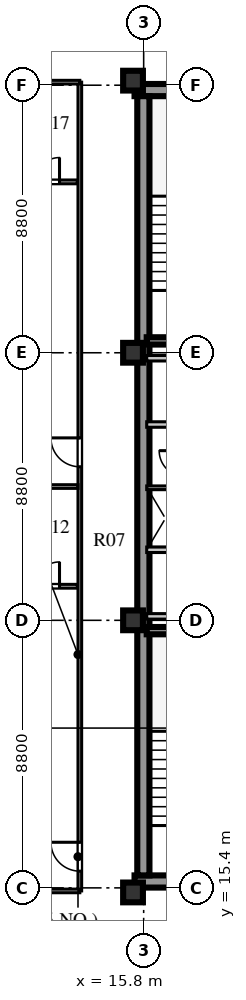
"""IFC4 building model, lengths in metres.
Left out: names, types, materials, properties, quantities, classifications, styles, units other than length and angle.
Written with IfcOpenShell. Run it as: python <this file> out.ifc"""

import sys

from ifc_helpers import new_model, si_unit, direction, frame, frame_2d, origin, origin_2d, place, context, subcontext, project, spatial, rectangle, extrude, element, fill, save


model = new_model("IFC4")
c1 = context("Model", 3, precision=1e-05, world=origin(), true_north=direction((0.0, 1.0)))
c2 = subcontext(c1, "Body", "Model", "MODEL_VIEW")
j1 = project(units=[si_unit("LENGTHUNIT", "METRE"), si_unit("PLANEANGLEUNIT", "RADIAN")], contexts=[c1])
p1 = place(None, origin())
s1 = spatial("IfcSite", under=j1, at=p1, CompositionType="ELEMENT")
p2 = place(p1, origin())
s2 = spatial("IfcBuilding", under=s1, at=p2, CompositionType="ELEMENT")
p3 = place(p2, frame((0.0, 0.0, 214.1)))
s3 = spatial("IfcBuildingStorey", under=s2, at=p3, CompositionType="ELEMENT", Elevation=214.1)
for number, where, z_axis, x_axis in (
    (1, (15.5, 15.61, 0.0), (0.0, 0.0, 1.0), (1.0, 0.0, 0.0)),
    (2, (15.5, 41.64, 0.0), (0.0, 0.0, 1.0), (1.0, 0.0, 0.0)),
):
    element("IfcWall", number, at=place(p3, frame(where, z_axis=z_axis, x_axis=x_axis)), inside=s3, PredefinedType="SHEAR", context=c2, shape_type="SweptSolid", body=[
        extrude(rectangle(XDim=9.48, YDim=0.4, at=frame_2d((4.74, 0.0))), origin(), (0.0, 0.0, 1.0), 3.66),
    ])
p4 = place(p3, frame((15.79, 15.81, 0.0), z_axis=(0.0, 0.0, 1.0), x_axis=(0.0, 1.0, 0.0)))
e3 = element("IfcWall", 3, at=p4, inside=s3, PredefinedType="SHEAR", context=c2, shape_type="SweptSolid", body=[
    extrude(rectangle(XDim=25.63, YDim=0.4, at=frame_2d((12.815, 0.0))), origin(), (0.0, 0.0, 1.0), 3.66),
])
for number, where, z_axis, x_axis in (
    (4, (15.45, 15.25, 0.0), (0.0, 0.0, 1.0), (1.0, 0.0, 0.0)),
    (5, (15.45, 24.2, 0.0), (0.0, 0.0, 1.0), (1.0, 0.0, 0.0)),
    (6, (15.45, 33.0, 0.0), (0.0, 0.0, 1.0), (1.0, 0.0, 0.0)),
    (7, (15.45, 41.95, 0.0), (0.0, 0.0, 1.0), (1.0, 0.0, 0.0)),
):
    element("IfcColumn", number, at=place(p3, frame(where, z_axis=z_axis, x_axis=x_axis)), inside=s3, PredefinedType="COLUMN", context=c2, shape_type="SweptSolid", body=[
        extrude(rectangle(XDim=0.65, YDim=0.65, at=origin_2d()), origin(), (0.0, 0.0, 1.0), 3.66),
    ])
p5 = place(p3, frame((15.9, 23.86, 0.0), z_axis=(0.0, 0.0, 1.0), x_axis=(1.0, 0.0, 0.0)))
e8 = element("IfcWall", 8, at=p5, inside=s3, PredefinedType="SHEAR", context=c2, shape_type="SweptSolid", body=[
    extrude(rectangle(XDim=3.52, YDim=0.24, at=frame_2d((1.76, 0.0))), origin(), (0.0, 0.0, 1.0), 3.9),
])
p6 = place(p3, frame((15.9, 26.52, 0.0), z_axis=(0.0, 0.0, 1.0), x_axis=(1.0, 0.0, 0.0)))
e9 = element("IfcWall", 9, at=p6, inside=s3, PredefinedType="SOLIDWALL", context=c2, shape_type="SweptSolid", body=[
    extrude(rectangle(XDim=8.68, YDim=0.18, at=frame_2d((4.34, 0.0))), origin(), (0.0, 0.0, 1.0), 3.66),
])
p7 = place(p6, frame((2.5, 0.0, 0.0)))
e10 = element("IfcOpeningElement", 10, at=p7, cuts=e9, PredefinedType="OPENING", context=c2, shape_type="SweptSolid", body=[
    extrude(rectangle(XDim=0.95, YDim=2.1, at=frame_2d((0.475, 1.05))), frame((0.0, 0.1, 0.0), z_axis=(0.0, -1.0, 0.0), x_axis=(1.0, 0.0, 0.0)), (0.0, 0.0, 1.0), 0.2),
])
p8 = place(p6, frame((6.0, 0.0, 0.0)))
e11 = element("IfcOpeningElement", 11, at=p8, cuts=e9, PredefinedType="OPENING", context=c2, shape_type="SweptSolid", body=[
    extrude(rectangle(XDim=0.95, YDim=2.1, at=frame_2d((0.475, 1.05))), frame((0.0, 0.1, 0.0), z_axis=(0.0, -1.0, 0.0), x_axis=(1.0, 0.0, 0.0)), (0.0, 0.0, 1.0), 0.2),
])
p9 = place(p3, frame((15.9, 24.33, 0.0), z_axis=(0.0, 0.0, 1.0), x_axis=(1.0, 0.0, 0.0)))
e12 = element("IfcWall", 12, at=p9, inside=s3, PredefinedType="SOLIDWALL", context=c2, shape_type="SweptSolid", body=[
    extrude(rectangle(XDim=8.68, YDim=0.18, at=frame_2d((4.34, 0.0))), origin(), (0.0, 0.0, 1.0), 3.06),
])
p10 = place(p3, frame((15.9, 28.56, 0.0), z_axis=(0.0, 0.0, 1.0), x_axis=(1.0, 0.0, 0.0)))
e13 = element("IfcWall", 13, at=p10, inside=s3, PredefinedType="PARTITIONING", context=c2, shape_type="SweptSolid", body=[
    extrude(rectangle(XDim=1.2, YDim=0.12, at=frame_2d((0.6, 0.0))), origin(), (0.0, 0.0, 1.0), 3.66),
])
p11 = place(p3, frame((15.9, 30.64, 0.0), z_axis=(0.0, 0.0, 1.0), x_axis=(1.0, 0.0, 0.0)))
e14 = element("IfcWall", 14, at=p11, inside=s3, PredefinedType="SOLIDWALL", context=c2, shape_type="SweptSolid", body=[
    extrude(rectangle(XDim=8.68, YDim=0.18, at=frame_2d((4.34, 0.0))), origin(), (0.0, 0.0, 1.0), 3.66),
])
p12 = place(p3, frame((15.9, 32.82, 0.0), z_axis=(0.0, 0.0, 1.0), x_axis=(1.0, 0.0, 0.0)))
e15 = element("IfcWall", 15, at=p12, inside=s3, PredefinedType="SOLIDWALL", context=c2, shape_type="SweptSolid", body=[
    extrude(rectangle(XDim=8.68, YDim=0.18, at=frame_2d((4.34, 0.0))), origin(), (0.0, 0.0, 1.0), 3.06),
])
p13 = place(p3, frame((15.9, 33.39, 0.0), z_axis=(0.0, 0.0, 1.0), x_axis=(1.0, 0.0, 0.0)))
e16 = element("IfcWall", 16, at=p13, inside=s3, PredefinedType="SHEAR", context=c2, shape_type="SweptSolid", body=[
    extrude(rectangle(XDim=3.52, YDim=0.24, at=frame_2d((1.76, 0.0))), origin(), (0.0, 0.0, 1.0), 3.9),
])
p14 = place(p3, frame((13.7, 15.3, 0.0), z_axis=(0.0, 0.0, 1.0), x_axis=(0.0, 1.0, 0.0)))
e17 = element("IfcWall", 17, at=p14, inside=s3, PredefinedType="PARTITIONING", context=c2, shape_type="SweptSolid", body=[
    extrude(rectangle(XDim=26.6, YDim=0.12, at=frame_2d((13.3, 0.0))), origin(), (0.0, 0.0, 1.0), 3.66),
])
p15 = place(p14, frame((0.65, 0.0, 0.0)))
e18 = element("IfcOpeningElement", 18, at=p15, cuts=e17, PredefinedType="OPENING", context=c2, shape_type="SweptSolid", body=[
    extrude(rectangle(XDim=0.95, YDim=2.1, at=frame_2d((0.475, 1.05))), frame((0.0, 0.07, 0.0), z_axis=(0.0, -1.0, 0.0), x_axis=(1.0, 0.0, 0.0)), (0.0, 0.0, 1.0), 0.14),
])
p16 = place(p14, frame((13.95, 0.0, 0.0)))
e19 = element("IfcOpeningElement", 19, at=p16, cuts=e17, PredefinedType="OPENING", context=c2, shape_type="SweptSolid", body=[
    extrude(rectangle(XDim=0.95, YDim=2.1, at=frame_2d((0.475, 1.05))), frame((0.0, 0.07, 0.0), z_axis=(0.0, -1.0, 0.0), x_axis=(1.0, 0.0, 0.0)), (0.0, 0.0, 1.0), 0.14),
])
for number, where, z_axis, x_axis in (
    (20, (8.08, 15.3, 0.0), (0.0, 0.0, 1.0), (1.0, 0.0, 0.0)),
    (21, (8.08, 41.9, 0.0), (0.0, 0.0, 1.0), (1.0, 0.0, 0.0)),
):
    element("IfcWall", number, at=place(p3, frame(where, z_axis=z_axis, x_axis=x_axis)), inside=s3, PredefinedType="PARTITIONING", context=c2, shape_type="SweptSolid", body=[
        extrude(rectangle(XDim=5.62, YDim=0.12, at=frame_2d((2.81, 0.0))), origin(), (0.0, 0.0, 1.0), 3.21),
    ])
p17 = place(p3, frame((10.45, 25.32, 0.0), z_axis=(0.0, 0.0, 1.0), x_axis=(1.0, 0.0, 0.0)))
e22 = element("IfcWall", 22, at=p17, inside=s3, PredefinedType="PLUMBINGWALL", context=c2, shape_type="SweptSolid", body=[
    extrude(rectangle(XDim=3.17, YDim=0.125, at=frame_2d((1.585, 0.0))), origin(), (0.0, 0.0, 1.0), 3.66),
])
p18 = place(p17, frame((0.16, 0.0, 0.0)))
e23 = element("IfcOpeningElement", 23, at=p18, cuts=e22, PredefinedType="OPENING", context=c2, shape_type="SweptSolid", body=[
    extrude(rectangle(XDim=0.8, YDim=2.05, at=frame_2d((0.4, 1.025))), frame((0.0, 0.073, 0.0), z_axis=(0.0, -1.0, 0.0), x_axis=(1.0, 0.0, 0.0)), (0.0, 0.0, 1.0), 0.145),
])
p19 = place(p17, frame((1.782, 0.0, 0.0)))
e24 = element("IfcOpeningElement", 24, at=p19, cuts=e22, PredefinedType="OPENING", context=c2, shape_type="SweptSolid", body=[
    extrude(rectangle(XDim=0.8, YDim=2.05, at=frame_2d((0.4, 1.025))), frame((0.0, 0.073, 0.0), z_axis=(0.0, -1.0, 0.0), x_axis=(1.0, 0.0, 0.0)), (0.0, 0.0, 1.0), 0.145),
])
p20 = place(p3, frame((8.08, 28.6, 0.0), z_axis=(0.0, 0.0, 1.0), x_axis=(1.0, 0.0, 0.0)))
e25 = element("IfcWall", 25, at=p20, inside=s3, PredefinedType="PARTITIONING", context=c2, shape_type="SweptSolid", body=[
    extrude(rectangle(XDim=5.56, YDim=0.12, at=frame_2d((2.78, 0.0))), origin(), (0.0, 0.0, 1.0), 3.66),
])
p21 = place(p3, frame((10.45, 38.62, 0.0), z_axis=(0.0, 0.0, 1.0), x_axis=(1.0, 0.0, 0.0)))
e26 = element("IfcWall", 26, at=p21, inside=s3, PredefinedType="PLUMBINGWALL", context=c2, shape_type="SweptSolid", body=[
    extrude(rectangle(XDim=3.17, YDim=0.125, at=frame_2d((1.585, 0.0))), origin(), (0.0, 0.0, 1.0), 3.66),
])
p22 = place(p21, frame((0.16, 0.0, 0.0)))
e27 = element("IfcOpeningElement", 27, at=p22, cuts=e26, PredefinedType="OPENING", context=c2, shape_type="SweptSolid", body=[
    extrude(rectangle(XDim=0.8, YDim=2.05, at=frame_2d((0.4, 1.025))), frame((0.0, 0.073, 0.0), z_axis=(0.0, -1.0, 0.0), x_axis=(1.0, 0.0, 0.0)), (0.0, 0.0, 1.0), 0.145),
])
p23 = place(p21, frame((1.782, 0.0, 0.0)))
e28 = element("IfcOpeningElement", 28, at=p23, cuts=e26, PredefinedType="OPENING", context=c2, shape_type="SweptSolid", body=[
    extrude(rectangle(XDim=0.8, YDim=2.05, at=frame_2d((0.4, 1.025))), frame((0.0, 0.073, 0.0), z_axis=(0.0, -1.0, 0.0), x_axis=(1.0, 0.0, 0.0)), (0.0, 0.0, 1.0), 0.145),
])
p24 = place(p19, origin())
e29 = element("IfcDoor", 29, at=p24, inside=s3, OperationType="SINGLE_SWING_RIGHT", PredefinedType="DOOR", context=c2, shape_type="SweptSolid", body=[
    extrude(rectangle(XDim=0.8, YDim=2.05, at=frame_2d((0.4, 1.025))), frame((0.0, 0.025, 0.0), z_axis=(0.0, -1.0, 0.0), x_axis=(1.0, 0.0, 0.0)), (0.0, 0.0, 1.0), 0.05),
])
fill(e24, e29)
p25 = place(p15, frame((0.95, 0.0, 0.0), z_axis=(0.0, 0.0, 1.0), x_axis=(-1.0, 0.0, 0.0)))
e30 = element("IfcDoor", 30, at=p25, inside=s3, OperationType="SINGLE_SWING_LEFT", PredefinedType="DOOR", context=c2, shape_type="SweptSolid", body=[
    extrude(rectangle(XDim=0.95, YDim=2.1, at=frame_2d((0.475, 1.05))), frame((0.0, 0.025, 0.0), z_axis=(0.0, -1.0, 0.0), x_axis=(1.0, 0.0, 0.0)), (0.0, 0.0, 1.0), 0.05),
])
fill(e18, e30)
p26 = place(p23, origin())
e31 = element("IfcDoor", 31, at=p26, inside=s3, OperationType="SINGLE_SWING_RIGHT", PredefinedType="DOOR", context=c2, shape_type="SweptSolid", body=[
    extrude(rectangle(XDim=0.8, YDim=2.05, at=frame_2d((0.4, 1.025))), frame((0.0, 0.025, 0.0), z_axis=(0.0, -1.0, 0.0), x_axis=(1.0, 0.0, 0.0)), (0.0, 0.0, 1.0), 0.05),
])
fill(e28, e31)
p27 = place(p16, frame((0.95, 0.0, 0.0), z_axis=(0.0, 0.0, 1.0), x_axis=(-1.0, 0.0, 0.0)))
e32 = element("IfcDoor", 32, at=p27, inside=s3, OperationType="SINGLE_SWING_LEFT", PredefinedType="DOOR", context=c2, shape_type="SweptSolid", body=[
    extrude(rectangle(XDim=0.95, YDim=2.1, at=frame_2d((0.475, 1.05))), frame((0.0, 0.025, 0.0), z_axis=(0.0, -1.0, 0.0), x_axis=(1.0, 0.0, 0.0)), (0.0, 0.0, 1.0), 0.05),
])
fill(e19, e32)
save(model, sys.argv[1])
